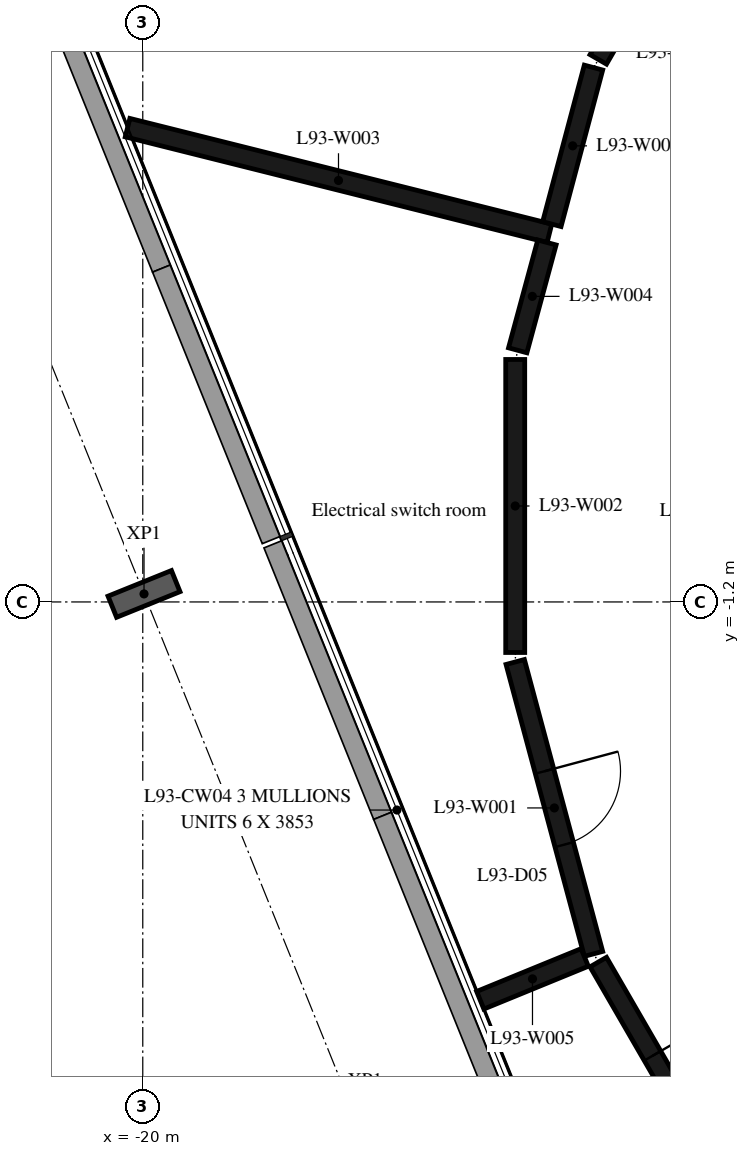
"""IFC4 building model, lengths in metres.
Left out: names, types, materials, properties, quantities, classifications, styles, units other than length and angle.
Written with IfcOpenShell. Run it as: python <this file> out.ifc"""

import sys

from ifc_helpers import new_model, si_unit, direction, frame, frame_2d, origin, origin_2d, place, context, subcontext, project, spatial, rectangle, i_section, extrude, element, fill, save


model = new_model("IFC4")
c1 = context("Model", 3, precision=1e-05, world=origin(), true_north=direction((0.0, 1.0)))
c2 = subcontext(c1, "Body", "Model", "MODEL_VIEW")
j1 = project(units=[si_unit("LENGTHUNIT", "METRE"), si_unit("PLANEANGLEUNIT", "RADIAN")], contexts=[c1])
p1 = place(None, origin())
s1 = spatial("IfcSite", under=j1, at=p1, CompositionType="ELEMENT")
p2 = place(p1, origin())
s2 = spatial("IfcBuilding", under=s1, at=p2, CompositionType="ELEMENT")
p3 = place(p2, frame((0.0, 0.0, 361.0)))
s3 = spatial("IfcBuildingStorey", under=s2, at=p3, CompositionType="ELEMENT", Elevation=361.0)
p4 = place(p3, frame((-19.984, -1.094, -0.38), z_axis=(0.0, 0.0, 1.0), x_axis=(-0.374606892434, 0.927183733755, 0.0)))
e1 = element("IfcColumn", 1, at=p4, inside=s3, PredefinedType="COLUMN", context=c2, shape_type="SweptSolid", body=[
    extrude(i_section(OverallWidth=0.3, OverallDepth=0.9, WebThickness=0.019, FlangeThickness=0.035, FilletRadius=0.03, at=origin_2d()), origin(), (0.0, 0.0, 1.0), 5.2),
])
p5 = place(p3, frame((-15.1, -1.99, 0.0), z_axis=(0.0, 0.0, 1.0), x_axis=(0.259072679895, -0.965857829358, 0.0)))
e2 = element("IfcWall", 2, at=p5, inside=s3, PredefinedType="PARTITIONING", context=c2, shape_type="SweptSolid", body=[
    extrude(rectangle(XDim=3.976, YDim=0.25, at=frame_2d((1.988, 0.0))), origin(), (0.0, 0.0, 1.0), 4.82),
])
p6 = place(p5, frame((1.488, 0.0, 0.0)))
e3 = element("IfcOpeningElement", 3, at=p6, cuts=e2, PredefinedType="OPENING", context=c2, shape_type="SweptSolid", body=[
    extrude(rectangle(XDim=1.0, YDim=2.1, at=frame_2d((0.5, 1.05))), frame((0.0, 0.135, 0.0), z_axis=(0.0, -1.0, 0.0), x_axis=(1.0, 0.0, 0.0)), (0.0, 0.0, 1.0), 0.27),
])
p7 = place(p3, frame((-15.1, 1.99, 0.0), z_axis=(0.0, 0.0, 1.0), x_axis=(0.0, -1.0, 0.0)))
e4 = element("IfcWall", 4, at=p7, inside=s3, PredefinedType="PARTITIONING", context=c2, shape_type="SweptSolid", body=[
    extrude(rectangle(XDim=3.855, YDim=0.25, at=frame_2d((1.927, 0.0))), origin(), (0.0, 0.0, 1.0), 4.82),
])
p8 = place(p3, frame((-14.65, 3.65, 0.0), z_axis=(0.0, 0.0, 1.0), x_axis=(-0.970034472151, 0.242967328748, 0.0)))
e5 = element("IfcWall", 5, at=p8, inside=s3, PredefinedType="PARTITIONING", context=c2, shape_type="SweptSolid", body=[
    extrude(rectangle(XDim=5.721, YDim=0.25, at=frame_2d((2.861, 0.0))), origin(), (0.0, 0.0, 1.0), 4.82),
])
p9 = place(p3, frame((-14.683, 3.529, 0.0), z_axis=(0.0, 0.0, 1.0), x_axis=(-0.261753947787, -0.9651346387, 0.0)))
e6 = element("IfcWall", 6, at=p9, inside=s3, PredefinedType="PARTITIONING", context=c2, shape_type="SweptSolid", body=[
    extrude(rectangle(XDim=1.47, YDim=0.25, at=frame_2d((0.735, 0.0))), origin(), (0.0, 0.0, 1.0), 4.82),
])
p10 = place(p3, frame((-14.186, -5.877, 0.0), z_axis=(0.0, 0.0, 1.0), x_axis=(-0.925476228273, -0.378805690165, 0.0)))
e7 = element("IfcWall", 7, at=p10, inside=s3, PredefinedType="PARTITIONING", context=c2, shape_type="SweptSolid", body=[
    extrude(rectangle(XDim=1.485, YDim=0.25, at=frame_2d((0.742, 0.0))), origin(), (0.0, 0.0, 1.0), 4.82),
])
p11 = place(p3, frame((-14.007, -5.938, 0.0), z_axis=(0.0, 0.0, 1.0), x_axis=(0.500708693508, -0.865615852585, 0.0)))
e8 = element("IfcWall", 8, at=p11, inside=s3, PredefinedType="PARTITIONING", context=c2, shape_type="SweptSolid", body=[
    extrude(rectangle(XDim=3.849, YDim=0.25, at=frame_2d((1.925, 0.0))), origin(), (0.0, 0.0, 1.0), 4.82),
])
p12 = place(p11, frame((1.425, 0.0, 0.0)))
e9 = element("IfcOpeningElement", 9, at=p12, cuts=e8, PredefinedType="OPENING", context=c2, shape_type="SweptSolid", body=[
    extrude(rectangle(XDim=1.0, YDim=2.1, at=frame_2d((0.5, 1.05))), frame((0.0, 0.135, 0.0), z_axis=(0.0, -1.0, 0.0), x_axis=(1.0, 0.0, 0.0)), (0.0, 0.0, 1.0), 0.27),
])
p13 = place(p3, frame((-14.07, 5.83, 0.0), z_axis=(0.0, 0.0, 1.0), x_axis=(-0.25709213915, -0.9663868956, 0.0)))
e10 = element("IfcWall", 10, at=p13, inside=s3, PredefinedType="PARTITIONING", context=c2, shape_type="SweptSolid", body=[
    extrude(rectangle(XDim=2.131, YDim=0.25, at=frame_2d((1.065, 0.0))), origin(), (0.0, 0.0, 1.0), 4.82),
])
p14 = place(p3, frame((-12.08, 9.27, 0.0), z_axis=(0.0, 0.0, 1.0), x_axis=(-0.500708693508, -0.865615852585, 0.0)))
e11 = element("IfcWall", 11, at=p14, inside=s3, PredefinedType="PARTITIONING", context=c2, shape_type="SweptSolid", body=[
    extrude(rectangle(XDim=3.849, YDim=0.25, at=frame_2d((1.925, 0.0))), origin(), (0.0, 0.0, 1.0), 4.82),
])
p15 = place(p14, frame((1.425, 0.0, 0.0)))
e12 = element("IfcOpeningElement", 12, at=p15, cuts=e11, PredefinedType="OPENING", context=c2, shape_type="SweptSolid", body=[
    extrude(rectangle(XDim=1.0, YDim=2.1, at=frame_2d((0.5, 1.05))), frame((0.0, 0.135, 0.0), z_axis=(0.0, -1.0, 0.0), x_axis=(1.0, 0.0, 0.0)), (0.0, 0.0, 1.0), 0.27),
])
p16 = place(p12, origin())
e13 = element("IfcDoor", 13, at=p16, inside=s3, OperationType="SINGLE_SWING_LEFT", PredefinedType="DOOR", context=c2, shape_type="SweptSolid", body=[
    extrude(rectangle(XDim=1.0, YDim=2.1, at=frame_2d((0.5, 1.05))), frame((0.0, 0.025, 0.0), z_axis=(0.0, -1.0, 0.0), x_axis=(1.0, 0.0, 0.0)), (0.0, 0.0, 1.0), 0.05),
])
fill(e9, e13)
p17 = place(p6, origin())
e14 = element("IfcDoor", 14, at=p17, inside=s3, OperationType="SINGLE_SWING_LEFT", PredefinedType="DOOR", context=c2, shape_type="SweptSolid", body=[
    extrude(rectangle(XDim=1.0, YDim=2.1, at=frame_2d((0.5, 1.05))), frame((0.0, 0.025, 0.0), z_axis=(0.0, -1.0, 0.0), x_axis=(1.0, 0.0, 0.0)), (0.0, 0.0, 1.0), 0.05),
])
fill(e3, e14)
save(model, sys.argv[1])
